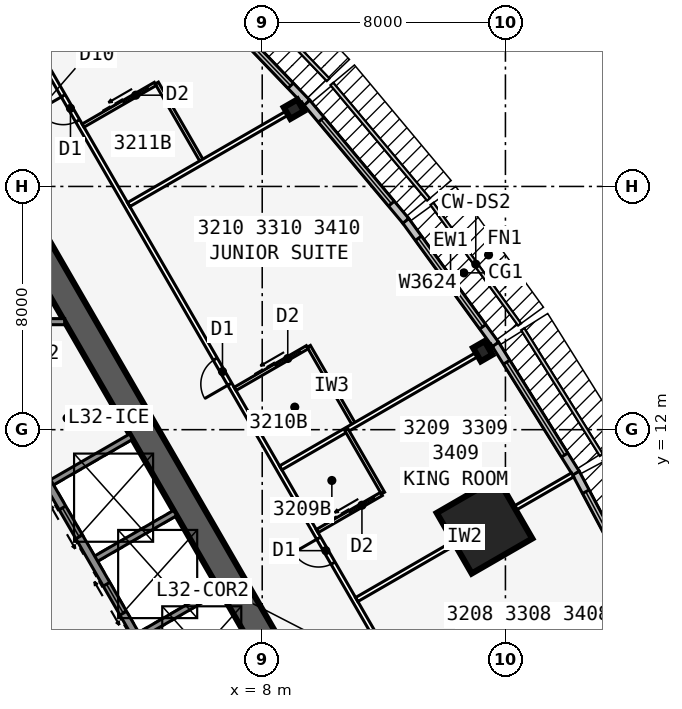
"""IFC4 building model, lengths in metres.
Left out: names, types, materials, properties, quantities, classifications, styles, units other than length and angle.
Written with IfcOpenShell. Run it as: python <this file> out.ifc"""

import sys

from ifc_helpers import new_model, si_unit, direction, frame, frame_2d, origin, origin_2d, place, context, subcontext, project, spatial, rectangle, i_section, extrude, element, fill, save


model = new_model("IFC4")
c1 = context("Model", 3, precision=1e-05, world=origin(), true_north=direction((0.0, 1.0)))
c2 = subcontext(c1, "Body", "Model", "MODEL_VIEW")
j1 = project(units=[si_unit("LENGTHUNIT", "METRE"), si_unit("PLANEANGLEUNIT", "RADIAN")], contexts=[c1])
p1 = place(None, origin())
s1 = spatial("IfcSite", under=j1, at=p1, CompositionType="ELEMENT")
p2 = place(p1, origin())
s2 = spatial("IfcBuilding", under=s1, at=p2, CompositionType="ELEMENT")
p3 = place(p2, frame((0.0, 0.0, 124.9)))
s3 = spatial("IfcBuildingStorey", under=s2, at=p3, CompositionType="ELEMENT", Elevation=124.9)
p4 = place(p3, frame((16.5, -9.526, 0.0), z_axis=(0.0, 0.0, 1.0), x_axis=(-0.499999749417, 0.866025548458, 0.0)))
e1 = element("IfcWall", 1, at=p4, inside=s3, PredefinedType="SHEAR", context=c2, shape_type="SweptSolid", body=[
    extrude(rectangle(XDim=33.0, YDim=0.9, at=frame_2d((16.5, 0.0))), origin(), (0.0, 0.0, 1.0), 3.4),
])
p5 = place(p4, frame((14.15, 0.0, 0.0)))
e2 = element("IfcOpeningElement", 2, at=p5, cuts=e1, PredefinedType="OPENING", context=c2, shape_type="SweptSolid", body=[
    extrude(rectangle(XDim=1.8, YDim=2.13, at=frame_2d((0.9, 1.065))), frame((0.0, 0.46, 0.0), z_axis=(0.0, -1.0, 0.0), x_axis=(1.0, 0.0, 0.0)), (0.0, 0.0, 1.0), 0.92),
])
p6 = place(p4, frame((12.6, 0.0, 0.0)))
e3 = element("IfcOpeningElement", 3, at=p6, cuts=e1, PredefinedType="OPENING", context=c2, shape_type="SweptSolid", body=[
    extrude(rectangle(XDim=1.0, YDim=2.13, at=frame_2d((0.5, 1.065))), frame((0.0, 0.46, 0.0), z_axis=(0.0, -1.0, 0.0), x_axis=(1.0, 0.0, 0.0)), (0.0, 0.0, 1.0), 0.92),
])
p7 = place(p3, frame((5.379, 2.586, 0.0), z_axis=(0.0, 0.0, 1.0), x_axis=(-0.500001375892, 0.866024609411, 0.0)))
e4 = element("IfcWall", 4, at=p7, inside=s3, PredefinedType="SOLIDWALL", context=c2, shape_type="SweptSolid", body=[
    extrude(rectangle(XDim=10.633, YDim=0.25, at=frame_2d((5.316, 0.0))), origin(), (0.0, 0.0, 1.0), 3.235),
])
p8 = place(p7, frame((9.164, 0.0, 0.0)))
e5 = element("IfcOpeningElement", 5, at=p8, cuts=e4, PredefinedType="OPENING", context=c2, shape_type="SweptSolid", body=[
    extrude(rectangle(XDim=0.9, YDim=2.13, at=frame_2d((0.45, 1.065))), frame((0.0, 0.135, 0.0), z_axis=(0.0, -1.0, 0.0), x_axis=(1.0, 0.0, 0.0)), (0.0, 0.0, 1.0), 0.27),
])
p9 = place(p7, frame((1.0, 0.0, 0.0)))
e6 = element("IfcOpeningElement", 6, at=p9, cuts=e4, PredefinedType="OPENING", context=c2, shape_type="SweptSolid", body=[
    extrude(rectangle(XDim=1.1, YDim=2.13, at=frame_2d((0.55, 1.065))), frame((0.0, 0.135, 0.0), z_axis=(0.0, -1.0, 0.0), x_axis=(1.0, 0.0, 0.0)), (0.0, 0.0, 1.0), 0.27),
])
p10 = place(p7, frame((3.9, 0.0, 0.0)))
e7 = element("IfcOpeningElement", 7, at=p10, cuts=e4, PredefinedType="OPENING", context=c2, shape_type="SweptSolid", body=[
    extrude(rectangle(XDim=1.1, YDim=2.13, at=frame_2d((0.55, 1.065))), frame((0.0, 0.135, 0.0), z_axis=(0.0, -1.0, 0.0), x_axis=(1.0, 0.0, 0.0)), (0.0, 0.0, 1.0), 0.27),
])
p11 = place(p7, frame((6.8, 0.0, 0.0)))
e8 = element("IfcOpeningElement", 8, at=p11, cuts=e4, PredefinedType="OPENING", context=c2, shape_type="SweptSolid", body=[
    extrude(rectangle(XDim=1.1, YDim=2.13, at=frame_2d((0.55, 1.065))), frame((0.0, 0.135, 0.0), z_axis=(0.0, -1.0, 0.0), x_axis=(1.0, 0.0, 0.0)), (0.0, 0.0, 1.0), 0.27),
])
for number, where, z_axis, x_axis in (
    (9, (3.879, 5.184, 0.0), (0.0, 0.0, 1.0), (0.866, 0.5, 0.0)),
    (10, (2.429, 7.696, 0.0), (0.0, 0.0, 1.0), (0.866, 0.5, 0.0)),
    (11, (0.979, 10.207, 0.0), (0.0, 0.0, 1.0), (0.866, 0.5, 0.0)),
):
    element("IfcWall", number, at=place(p3, frame(where, z_axis=z_axis, x_axis=x_axis)), inside=s3, PredefinedType="SOLIDWALL", context=c2, shape_type="SweptSolid", body=[
        extrude(rectangle(XDim=3.125, YDim=0.2, at=frame_2d((1.562, 0.0))), origin(), (0.0, 0.0, 1.0), 3.235),
    ])
for number, where, z_axis, x_axis in (
    (12, (15.254, 14.58, 0.0), (0.0, 0.0, 1.0), (0.866, 0.5, 0.0)),
    (13, (9.041, 22.541, 0.0), (0.0, 0.0, 1.0), (-0.5, 0.866, 0.0)),
):
    element("IfcColumn", number, at=place(p3, frame(where, z_axis=z_axis, x_axis=x_axis)), inside=s3, PredefinedType="COLUMN", context=c2, shape_type="SweptSolid", body=[
        extrude(i_section(OverallWidth=0.437, OverallDepth=0.513, WebThickness=0.061, FlangeThickness=0.097, at=origin_2d()), origin(), (0.0, 0.0, 1.0), 3.4),
    ])
p12 = place(p3, frame((15.312, 8.84, 0.0), z_axis=(0.0, 0.0, 1.0), x_axis=(0.866025403784, 0.5, 0.0)))
e14 = element("IfcColumn", 14, at=p12, inside=s3, PredefinedType="COLUMN", context=c2, shape_type="SweptSolid", body=[
    extrude(rectangle(XDim=2.3, YDim=2.3, at=origin_2d()), origin(), (0.0, 0.0, 1.0), 3.4),
])
p13 = place(p3, frame((20.663, 6.161, 0.0), z_axis=(0.0, 0.0, 1.0), x_axis=(-0.469404966864, 0.882982999317, 0.0)))
e15 = element("IfcWall", 15, at=p13, inside=s3, PredefinedType="STANDARD", context=c2, shape_type="SweptSolid", body=[
    extrude(rectangle(XDim=5.003, YDim=0.25, at=frame_2d((2.501, 0.0))), origin(), (0.0, 0.0, 1.0), 3.235),
])
p14 = place(p13, frame((0.701, 0.0, 0.45)))
e16 = element("IfcOpeningElement", 16, at=p14, cuts=e15, PredefinedType="OPENING", context=c2, shape_type="SweptSolid", body=[
    extrude(rectangle(XDim=3.6, YDim=2.4, at=frame_2d((1.8, 1.2))), frame((0.0, 0.135, 0.0), z_axis=(0.0, -1.0, 0.0), x_axis=(1.0, 0.0, 0.0)), (0.0, 0.0, 1.0), 0.27),
])
p15 = place(p3, frame((18.319, 10.571, 0.0), z_axis=(0.0, 0.0, 1.0), x_axis=(-0.529990167382, 0.84800378683, 0.0)))
e17 = element("IfcWall", 17, at=p15, inside=s3, PredefinedType="STANDARD", context=c2, shape_type="SweptSolid", body=[
    extrude(rectangle(XDim=5.003, YDim=0.25, at=frame_2d((2.501, 0.0))), origin(), (0.0, 0.0, 1.0), 3.235),
])
p16 = place(p15, frame((0.701, 0.0, 0.45)))
e18 = element("IfcOpeningElement", 18, at=p16, cuts=e17, PredefinedType="OPENING", context=c2, shape_type="SweptSolid", body=[
    extrude(rectangle(XDim=3.6, YDim=2.4, at=frame_2d((1.8, 1.2))), frame((0.0, 0.135, 0.0), z_axis=(0.0, -1.0, 0.0), x_axis=(1.0, 0.0, 0.0)), (0.0, 0.0, 1.0), 0.27),
])
p17 = place(p3, frame((15.672, 14.807, 0.0), z_axis=(0.0, 0.0, 1.0), x_axis=(-0.587669188412, 0.809101307001, 0.0)))
e19 = element("IfcWall", 19, at=p17, inside=s3, PredefinedType="STANDARD", context=c2, shape_type="SweptSolid", body=[
    extrude(rectangle(XDim=5.028, YDim=0.25, at=frame_2d((2.514, 0.0))), origin(), (0.0, 0.0, 1.0), 3.235),
])
p18 = place(p17, frame((0.714, 0.0, 0.45)))
e20 = element("IfcOpeningElement", 20, at=p18, cuts=e19, PredefinedType="OPENING", context=c2, shape_type="SweptSolid", body=[
    extrude(rectangle(XDim=3.6, YDim=2.4, at=frame_2d((1.8, 1.2))), frame((0.0, 0.135, 0.0), z_axis=(0.0, -1.0, 0.0), x_axis=(1.0, 0.0, 0.0)), (0.0, 0.0, 1.0), 0.27),
])
p19 = place(p3, frame((12.723, 18.868, 0.0), z_axis=(0.0, 0.0, 1.0), x_axis=(-0.641810386606, 0.766863369607, 0.0)))
e21 = element("IfcWall", 21, at=p19, inside=s3, PredefinedType="STANDARD", context=c2, shape_type="SweptSolid", body=[
    extrude(rectangle(XDim=5.076, YDim=0.25, at=frame_2d((2.538, 0.0))), origin(), (0.0, 0.0, 1.0), 3.235),
])
p20 = place(p19, frame((0.738, 0.0, 0.45)))
e22 = element("IfcOpeningElement", 22, at=p20, cuts=e21, PredefinedType="OPENING", context=c2, shape_type="SweptSolid", body=[
    extrude(rectangle(XDim=3.6, YDim=2.4, at=frame_2d((1.8, 1.2))), frame((0.0, 0.135, 0.0), z_axis=(0.0, -1.0, 0.0), x_axis=(1.0, 0.0, 0.0)), (0.0, 0.0, 1.0), 0.27),
])
p21 = place(p3, frame((9.471, 22.754, 0.0), z_axis=(0.0, 0.0, 1.0), x_axis=(-0.691719937936, 0.722165858693, 0.0)))
e23 = element("IfcWall", 23, at=p21, inside=s3, PredefinedType="STANDARD", context=c2, shape_type="SweptSolid", body=[
    extrude(rectangle(XDim=5.148, YDim=0.25, at=frame_2d((2.574, 0.0))), origin(), (0.0, 0.0, 1.0), 3.235),
])
p22 = place(p21, frame((0.774, 0.0, 0.45)))
e24 = element("IfcOpeningElement", 24, at=p22, cuts=e23, PredefinedType="OPENING", context=c2, shape_type="SweptSolid", body=[
    extrude(rectangle(XDim=3.6, YDim=2.4, at=frame_2d((1.8, 1.2))), frame((0.0, 0.135, 0.0), z_axis=(0.0, -1.0, 0.0), x_axis=(1.0, 0.0, 0.0)), (0.0, 0.0, 1.0), 0.27),
])
p23 = place(p3, frame((21.586, -11.885, 0.0), z_axis=(0.0, 0.0, 1.0), x_axis=(-0.500001915564, 0.86602429783, 0.0)))
e25 = element("IfcWall", 25, at=p23, inside=s3, PredefinedType="PARTITIONING", context=c2, shape_type="SweptSolid", body=[
    extrude(rectangle(XDim=42.172, YDim=0.15, at=frame_2d((21.086, 0.0))), origin(), (0.0, 0.0, 1.0), 3.235),
])
p24 = place(p23, frame((1.911, 0.0, 0.0)))
e26 = element("IfcOpeningElement", 26, at=p24, cuts=e25, PredefinedType="OPENING", context=c2, shape_type="SweptSolid", body=[
    extrude(rectangle(XDim=0.95, YDim=2.13, at=frame_2d((0.475, 1.065))), frame((0.0, 0.085, 0.0), z_axis=(0.0, -1.0, 0.0), x_axis=(1.0, 0.0, 0.0)), (0.0, 0.0, 1.0), 0.17),
])
p25 = place(p23, frame((7.511, 0.0, 0.0)))
e27 = element("IfcOpeningElement", 27, at=p25, cuts=e25, PredefinedType="OPENING", context=c2, shape_type="SweptSolid", body=[
    extrude(rectangle(XDim=0.95, YDim=2.13, at=frame_2d((0.475, 1.065))), frame((0.0, 0.085, 0.0), z_axis=(0.0, -1.0, 0.0), x_axis=(1.0, 0.0, 0.0)), (0.0, 0.0, 1.0), 0.17),
])
p26 = place(p23, frame((14.311, 0.0, 0.0)))
e28 = element("IfcOpeningElement", 28, at=p26, cuts=e25, PredefinedType="OPENING", context=c2, shape_type="SweptSolid", body=[
    extrude(rectangle(XDim=0.95, YDim=2.13, at=frame_2d((0.475, 1.065))), frame((0.0, 0.085, 0.0), z_axis=(0.0, -1.0, 0.0), x_axis=(1.0, 0.0, 0.0)), (0.0, 0.0, 1.0), 0.17),
])
p27 = place(p23, frame((22.511, 0.0, 0.0)))
e29 = element("IfcOpeningElement", 29, at=p27, cuts=e25, PredefinedType="OPENING", context=c2, shape_type="SweptSolid", body=[
    extrude(rectangle(XDim=0.95, YDim=2.13, at=frame_2d((0.475, 1.065))), frame((0.0, 0.085, 0.0), z_axis=(0.0, -1.0, 0.0), x_axis=(1.0, 0.0, 0.0)), (0.0, 0.0, 1.0), 0.17),
])
p28 = place(p23, frame((29.311, 0.0, 0.0)))
e30 = element("IfcOpeningElement", 30, at=p28, cuts=e25, PredefinedType="OPENING", context=c2, shape_type="SweptSolid", body=[
    extrude(rectangle(XDim=0.95, YDim=2.13, at=frame_2d((0.475, 1.065))), frame((0.0, 0.085, 0.0), z_axis=(0.0, -1.0, 0.0), x_axis=(1.0, 0.0, 0.0)), (0.0, 0.0, 1.0), 0.17),
])
p29 = place(p23, frame((39.311, 0.0, 0.0)))
e31 = element("IfcOpeningElement", 31, at=p29, cuts=e25, PredefinedType="OPENING", context=c2, shape_type="SweptSolid", body=[
    extrude(rectangle(XDim=0.95, YDim=2.13, at=frame_2d((0.475, 1.065))), frame((0.0, 0.085, 0.0), z_axis=(0.0, -1.0, 0.0), x_axis=(1.0, 0.0, 0.0)), (0.0, 0.0, 1.0), 0.17),
])
p30 = place(p3, frame((11.108, 6.413, 0.0), z_axis=(0.0, 0.0, 1.0), x_axis=(0.866026407964, 0.499998260706, 0.0)))
e32 = element("IfcWall", 32, at=p30, inside=s3, PredefinedType="PARTITIONING", context=c2, shape_type="SweptSolid", body=[
    extrude(rectangle(XDim=8.199, YDim=0.15, at=frame_2d((4.099, 0.0))), origin(), (0.0, 0.0, 1.0), 2.389),
])
p31 = place(p3, frame((8.608, 10.743, 0.0), z_axis=(0.0, 0.0, 1.0), x_axis=(0.866041663918, 0.499971835565, 0.0)))
e33 = element("IfcWall", 33, at=p31, inside=s3, PredefinedType="PARTITIONING", context=c2, shape_type="SweptSolid", body=[
    extrude(rectangle(XDim=8.022, YDim=0.15, at=frame_2d((4.011, 0.0))), origin(), (0.0, 0.0, 1.0), 2.389),
])
p32 = place(p3, frame((3.608, 19.404, 0.0), z_axis=(0.0, 0.0, 1.0), x_axis=(0.866015989873, 0.500016305018, 0.0)))
e34 = element("IfcWall", 34, at=p32, inside=s3, PredefinedType="PARTITIONING", context=c2, shape_type="SweptSolid", body=[
    extrude(rectangle(XDim=6.616, YDim=0.15, at=frame_2d((3.308, 0.0))), origin(), (0.0, 0.0, 1.0), 2.389),
])
p33 = place(p3, frame((11.973, 9.915, 0.0), z_axis=(0.0, 0.0, 1.0), x_axis=(-0.499957262057, 0.866050077142, 0.0)))
e35 = element("IfcWall", 35, at=p33, inside=s3, PredefinedType="PLUMBINGWALL", context=c2, shape_type="SweptSolid", body=[
    extrude(rectangle(XDim=2.4, YDim=0.12, at=frame_2d((1.2, 0.0))), origin(), (0.0, 0.0, 1.0), 3.235),
])
p34 = place(p3, frame((9.808, 8.665, 0.0), z_axis=(0.0, 0.0, 1.0), x_axis=(0.866023955769, 0.500002508028, 0.0)))
e36 = element("IfcWall", 36, at=p34, inside=s3, PredefinedType="PLUMBINGWALL", context=c2, shape_type="SweptSolid", body=[
    extrude(rectangle(XDim=2.44, YDim=0.12, at=frame_2d((1.22, 0.0))), origin(), (0.0, 0.0, 1.0), 3.235),
])
p35 = place(p34, frame((1.25, 0.0, 0.0)))
e37 = element("IfcOpeningElement", 37, at=p35, cuts=e36, PredefinedType="OPENING", context=c2, shape_type="SweptSolid", body=[
    extrude(rectangle(XDim=0.9, YDim=2.13, at=frame_2d((0.45, 1.065))), frame((0.0, 0.07, 0.0), z_axis=(0.0, -1.0, 0.0), x_axis=(1.0, 0.0, 0.0)), (0.0, 0.0, 1.0), 0.14),
])
p36 = place(p3, frame((11.033, 12.143, 0.0), z_axis=(0.0, 0.0, 1.0), x_axis=(-0.50002537861, 0.866010750942, 0.0)))
e38 = element("IfcWall", 38, at=p36, inside=s3, PredefinedType="PLUMBINGWALL", context=c2, shape_type="SweptSolid", body=[
    extrude(rectangle(XDim=3.0, YDim=0.12, at=frame_2d((1.5, 0.0))), origin(), (0.0, 0.0, 1.0), 3.235),
])
p37 = place(p3, frame((7.108, 13.341, 0.0), z_axis=(0.0, 0.0, 1.0), x_axis=(0.866035715982, 0.499982138324, 0.0)))
e39 = element("IfcWall", 39, at=p37, inside=s3, PredefinedType="PLUMBINGWALL", context=c2, shape_type="SweptSolid", body=[
    extrude(rectangle(XDim=2.74, YDim=0.12, at=frame_2d((1.37, 0.0))), origin(), (0.0, 0.0, 1.0), 3.235),
])
p38 = place(p37, frame((1.55, 0.0, 0.0)))
e40 = element("IfcOpeningElement", 40, at=p38, cuts=e39, PredefinedType="OPENING", context=c2, shape_type="SweptSolid", body=[
    extrude(rectangle(XDim=0.9, YDim=2.13, at=frame_2d((0.45, 1.065))), frame((0.0, 0.07, 0.0), z_axis=(0.0, -1.0, 0.0), x_axis=(1.0, 0.0, 0.0)), (0.0, 0.0, 1.0), 0.14),
])
p39 = place(p3, frame((6.033, 20.803, 0.0), z_axis=(0.0, 0.0, 1.0), x_axis=(-0.499990139034, 0.866031096941, 0.0)))
e41 = element("IfcWall", 41, at=p39, inside=s3, PredefinedType="PLUMBINGWALL", context=c2, shape_type="SweptSolid", body=[
    extrude(rectangle(XDim=3.0, YDim=0.12, at=frame_2d((1.5, 0.0))), origin(), (0.0, 0.0, 1.0), 3.235),
])
p40 = place(p3, frame((2.108, 22.002, 0.0), z_axis=(0.0, 0.0, 1.0), x_axis=(0.866035715982, 0.499982138324, 0.0)))
e42 = element("IfcWall", 42, at=p40, inside=s3, PredefinedType="PLUMBINGWALL", context=c2, shape_type="SweptSolid", body=[
    extrude(rectangle(XDim=2.74, YDim=0.12, at=frame_2d((1.37, 0.0))), origin(), (0.0, 0.0, 1.0), 3.235),
])
p41 = place(p40, frame((1.55, 0.0, 0.0)))
e43 = element("IfcOpeningElement", 43, at=p41, cuts=e42, PredefinedType="OPENING", context=c2, shape_type="SweptSolid", body=[
    extrude(rectangle(XDim=0.9, YDim=2.13, at=frame_2d((0.45, 1.065))), frame((0.0, 0.07, 0.0), z_axis=(0.0, -1.0, 0.0), x_axis=(1.0, 0.0, 0.0)), (0.0, 0.0, 1.0), 0.14),
])
p42 = place(p3, frame((-1.501, 15.552, 0.0), z_axis=(0.0, 0.0, 1.0), x_axis=(1.0, 0.0, 0.0)))
e44 = element("IfcWall", 44, at=p42, inside=s3, PredefinedType="SOLIDWALL", context=c2, shape_type="SweptSolid", body=[
    extrude(rectangle(XDim=3.002, YDim=0.2, at=frame_2d((1.501, 0.0))), origin(), (0.0, 0.0, 1.0), 3.235),
])
p43 = place(p14, origin())
e45 = element("IfcWindow", 45, at=p43, inside=s3, PartitioningType="SINGLE_PANEL", PredefinedType="WINDOW", context=c2, shape_type="SweptSolid", body=[
    extrude(rectangle(XDim=3.6, YDim=2.4, at=frame_2d((1.8, 1.2))), frame((0.0, 0.03, 0.0), z_axis=(0.0, -1.0, 0.0), x_axis=(1.0, 0.0, 0.0)), (0.0, 0.0, 1.0), 0.06),
])
fill(e16, e45)
p44 = place(p16, origin())
e46 = element("IfcWindow", 46, at=p44, inside=s3, PartitioningType="SINGLE_PANEL", PredefinedType="WINDOW", context=c2, shape_type="SweptSolid", body=[
    extrude(rectangle(XDim=3.6, YDim=2.4, at=frame_2d((1.8, 1.2))), frame((0.0, 0.03, 0.0), z_axis=(0.0, -1.0, 0.0), x_axis=(1.0, 0.0, 0.0)), (0.0, 0.0, 1.0), 0.06),
])
fill(e18, e46)
p45 = place(p18, origin())
e47 = element("IfcWindow", 47, at=p45, inside=s3, PartitioningType="SINGLE_PANEL", PredefinedType="WINDOW", context=c2, shape_type="SweptSolid", body=[
    extrude(rectangle(XDim=3.6, YDim=2.4, at=frame_2d((1.8, 1.2))), frame((0.0, 0.03, 0.0), z_axis=(0.0, -1.0, 0.0), x_axis=(1.0, 0.0, 0.0)), (0.0, 0.0, 1.0), 0.06),
])
fill(e20, e47)
p46 = place(p20, origin())
e48 = element("IfcWindow", 48, at=p46, inside=s3, PartitioningType="SINGLE_PANEL", PredefinedType="WINDOW", context=c2, shape_type="SweptSolid", body=[
    extrude(rectangle(XDim=3.6, YDim=2.4, at=frame_2d((1.8, 1.2))), frame((0.0, 0.03, 0.0), z_axis=(0.0, -1.0, 0.0), x_axis=(1.0, 0.0, 0.0)), (0.0, 0.0, 1.0), 0.06),
])
fill(e22, e48)
p47 = place(p22, origin())
e49 = element("IfcWindow", 49, at=p47, inside=s3, PartitioningType="SINGLE_PANEL", PredefinedType="WINDOW", context=c2, shape_type="SweptSolid", body=[
    extrude(rectangle(XDim=3.6, YDim=2.4, at=frame_2d((1.8, 1.2))), frame((0.0, 0.03, 0.0), z_axis=(0.0, -1.0, 0.0), x_axis=(1.0, 0.0, 0.0)), (0.0, 0.0, 1.0), 0.06),
])
fill(e24, e49)
p48 = place(p35, origin())
e50 = element("IfcDoor", 50, at=p48, inside=s3, OperationType="SLIDING_TO_LEFT", PredefinedType="DOOR", context=c2, shape_type="SweptSolid", body=[
    extrude(rectangle(XDim=0.9, YDim=2.13, at=frame_2d((0.45, 1.065))), frame((0.0, 0.025, 0.0), z_axis=(0.0, -1.0, 0.0), x_axis=(1.0, 0.0, 0.0)), (0.0, 0.0, 1.0), 0.05),
])
fill(e37, e50)
p49 = place(p27, origin())
e51 = element("IfcDoor", 51, at=p49, inside=s3, OperationType="SINGLE_SWING_RIGHT", PredefinedType="DOOR", context=c2, shape_type="SweptSolid", body=[
    extrude(rectangle(XDim=0.95, YDim=2.13, at=frame_2d((0.475, 1.065))), frame((0.0, 0.025, 0.0), z_axis=(0.0, -1.0, 0.0), x_axis=(1.0, 0.0, 0.0)), (0.0, 0.0, 1.0), 0.05),
])
fill(e29, e51)
p50 = place(p38, origin())
e52 = element("IfcDoor", 52, at=p50, inside=s3, OperationType="SLIDING_TO_LEFT", PredefinedType="DOOR", context=c2, shape_type="SweptSolid", body=[
    extrude(rectangle(XDim=0.9, YDim=2.13, at=frame_2d((0.45, 1.065))), frame((0.0, 0.025, 0.0), z_axis=(0.0, -1.0, 0.0), x_axis=(1.0, 0.0, 0.0)), (0.0, 0.0, 1.0), 0.05),
])
fill(e40, e52)
p51 = place(p28, origin())
e53 = element("IfcDoor", 53, at=p51, inside=s3, OperationType="SINGLE_SWING_LEFT", PredefinedType="DOOR", context=c2, shape_type="SweptSolid", body=[
    extrude(rectangle(XDim=0.95, YDim=2.13, at=frame_2d((0.475, 1.065))), frame((0.0, 0.025, 0.0), z_axis=(0.0, -1.0, 0.0), x_axis=(1.0, 0.0, 0.0)), (0.0, 0.0, 1.0), 0.05),
])
fill(e30, e53)
p52 = place(p41, origin())
e54 = element("IfcDoor", 54, at=p52, inside=s3, OperationType="SLIDING_TO_LEFT", PredefinedType="DOOR", context=c2, shape_type="SweptSolid", body=[
    extrude(rectangle(XDim=0.9, YDim=2.13, at=frame_2d((0.45, 1.065))), frame((0.0, 0.025, 0.0), z_axis=(0.0, -1.0, 0.0), x_axis=(1.0, 0.0, 0.0)), (0.0, 0.0, 1.0), 0.05),
])
fill(e43, e54)
p53 = place(p29, origin())
e55 = element("IfcDoor", 55, at=p53, inside=s3, OperationType="SINGLE_SWING_RIGHT", PredefinedType="DOOR", context=c2, shape_type="SweptSolid", body=[
    extrude(rectangle(XDim=0.95, YDim=2.13, at=frame_2d((0.475, 1.065))), frame((0.0, 0.025, 0.0), z_axis=(0.0, -1.0, 0.0), x_axis=(1.0, 0.0, 0.0)), (0.0, 0.0, 1.0), 0.05),
])
fill(e31, e55)
p54 = place(p10, origin())
e56 = element("IfcDoor", 56, at=p54, inside=s3, OperationType="DOUBLE_DOOR_SLIDING", PredefinedType="USERDEFINED", context=c2, shape_type="SweptSolid", body=[
    extrude(rectangle(XDim=1.1, YDim=2.13, at=frame_2d((0.55, 1.065))), frame((0.0, 0.025, 0.0), z_axis=(0.0, -1.0, 0.0), x_axis=(1.0, 0.0, 0.0)), (0.0, 0.0, 1.0), 0.05),
])
fill(e7, e56)
p55 = place(p11, origin())
e57 = element("IfcDoor", 57, at=p55, inside=s3, OperationType="DOUBLE_DOOR_SLIDING", PredefinedType="USERDEFINED", context=c2, shape_type="SweptSolid", body=[
    extrude(rectangle(XDim=1.1, YDim=2.13, at=frame_2d((0.55, 1.065))), frame((0.0, 0.025, 0.0), z_axis=(0.0, -1.0, 0.0), x_axis=(1.0, 0.0, 0.0)), (0.0, 0.0, 1.0), 0.05),
])
fill(e8, e57)
save(model, sys.argv[1])
